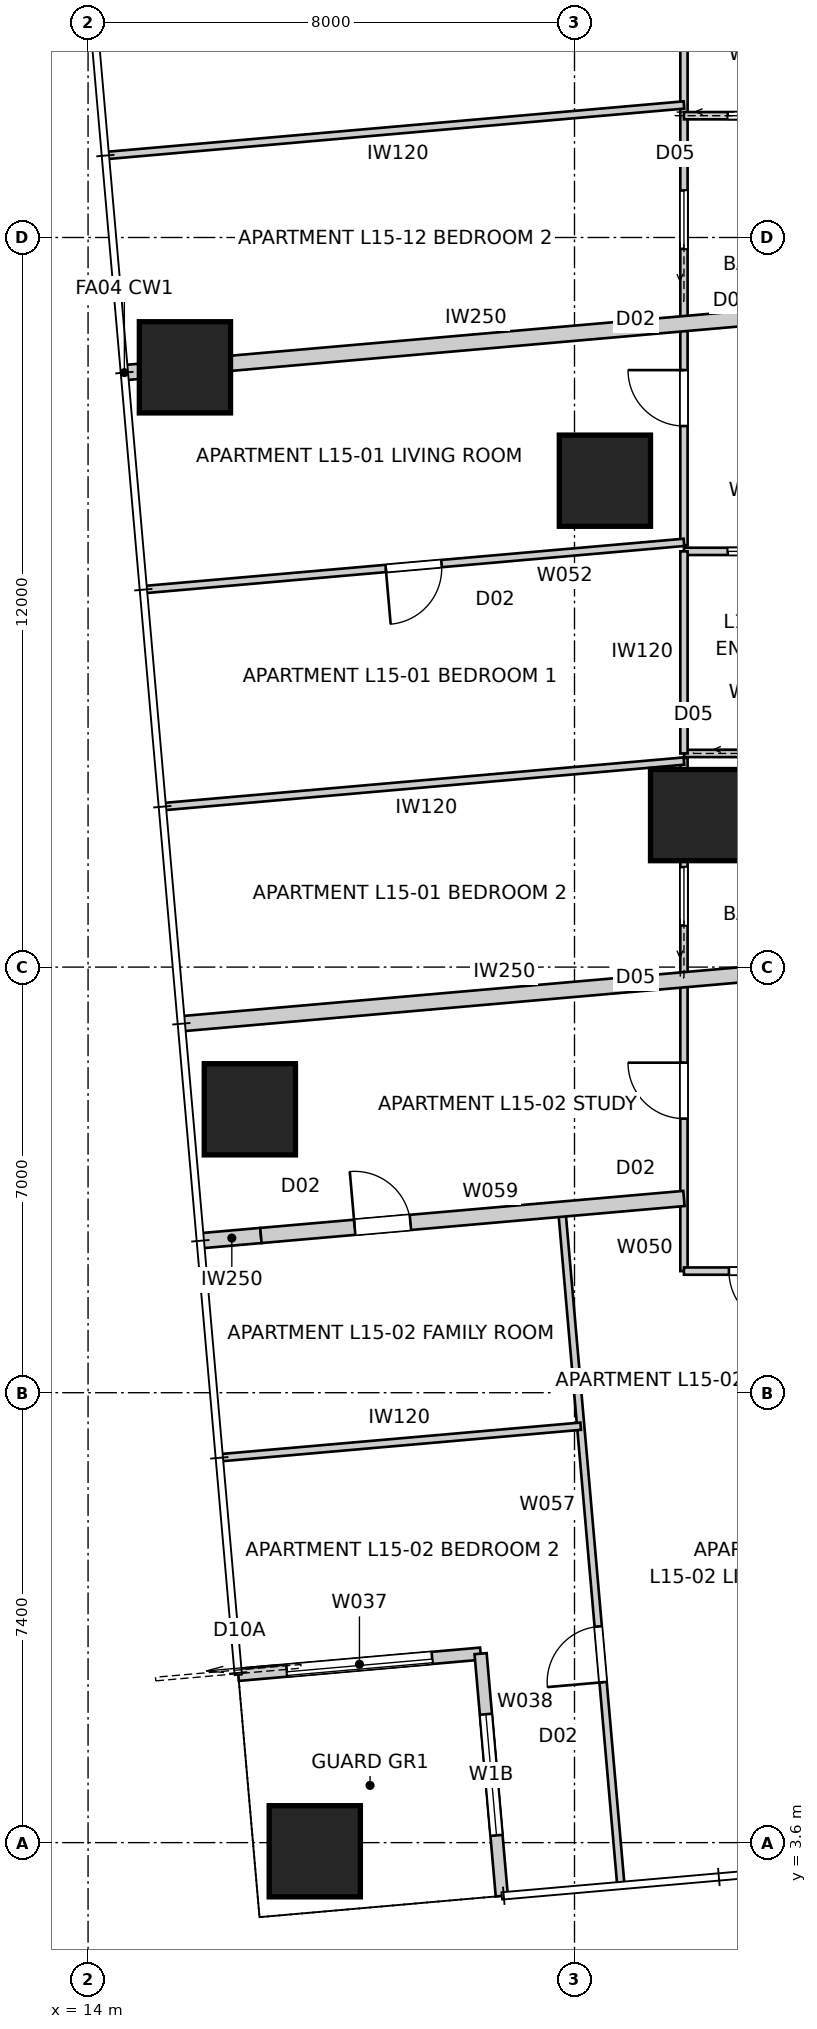
"""IFC4 building model, lengths in metres.
Left out: names, types, materials, properties, quantities, classifications, styles, units other than length and angle.
Written with IfcOpenShell. Run it as: python <this file> out.ifc"""

import sys

from ifc_helpers import new_model, si_unit, direction, frame, frame_2d, origin, origin_2d, place, context, subcontext, project, spatial, rectangle, extrude, element, fill, save


model = new_model("IFC4")
c1 = context("Model", 3, precision=1e-05, world=origin(), true_north=direction((0.0, 1.0)))
c2 = subcontext(c1, "Body", "Model", "MODEL_VIEW")
j1 = project(units=[si_unit("LENGTHUNIT", "METRE"), si_unit("PLANEANGLEUNIT", "RADIAN")], contexts=[c1])
p1 = place(None, origin())
s1 = spatial("IfcSite", under=j1, at=p1, CompositionType="ELEMENT")
p2 = place(p1, origin())
s2 = spatial("IfcBuilding", under=s1, at=p2, CompositionType="ELEMENT")
p3 = place(p2, frame((0.0, 0.0, 57.4)))
s3 = spatial("IfcBuildingStorey", under=s2, at=p3, CompositionType="ELEMENT", Elevation=57.4)
for number, where, z_axis, x_axis in (
    (1, (17.729, 3.458, 0.0), (0.0, 0.0, 1.0), (1.0, 0.0, 0.0)),
    (2, (15.593, 27.865, 0.0), (0.0, 0.0, 1.0), (1.0, 0.0, 0.0)),
    (3, (16.661, 15.661, 0.0), (0.0, 0.0, 1.0), (1.0, 0.0, 0.0)),
    (4, (22.5, 26.0, 0.0), (0.0, 0.0, 1.0), (1.0, 0.0, 0.0)),
    (5, (24.0, 20.5, 0.0), (0.0, 0.0, 1.0), (1.0, 0.0, 0.0)),
):
    element("IfcColumn", number, at=place(p3, frame(where, z_axis=z_axis, x_axis=x_axis)), inside=s3, PredefinedType="COLUMN", context=c2, shape_type="SweptSolid", body=[
        extrude(rectangle(XDim=1.5, YDim=1.5, at=origin_2d()), origin(), (0.0, 0.0, 1.0), 3.4),
    ])
p4 = place(p3, frame((16.471, 6.359, 0.0), z_axis=(0.0, 0.0, 1.0), x_axis=(0.99619418125, 0.087161650072, 0.0)))
e6 = element("IfcWall", 6, at=p4, inside=s3, PredefinedType="SOLIDWALL", context=c2, shape_type="SweptSolid", body=[
    extrude(rectangle(XDim=4.0, YDim=0.2, at=frame_2d((2.0, 0.0))), origin(), (0.0, 0.0, 1.0), 3.25),
])
p5 = place(p4, frame((0.8, 0.0, 0.0)))
e7 = element("IfcOpeningElement", 7, at=p5, cuts=e6, PredefinedType="OPENING", context=c2, shape_type="SweptSolid", body=[
    extrude(rectangle(XDim=2.4, YDim=2.1, at=frame_2d((1.2, 1.05))), frame((0.0, 0.11, 0.0), z_axis=(0.0, -1.0, 0.0), x_axis=(1.0, 0.0, 0.0)), (0.0, 0.0, 1.0), 0.22),
])
p6 = place(p3, frame((20.456, 6.708, 0.0), z_axis=(0.0, 0.0, 1.0), x_axis=(0.087156350505, -0.99619464492, 0.0)))
e8 = element("IfcWall", 8, at=p6, inside=s3, PredefinedType="SOLIDWALL", context=c2, shape_type="SweptSolid", body=[
    extrude(rectangle(XDim=4.0, YDim=0.2, at=frame_2d((2.0, 0.0))), origin(), (0.0, 0.0, 1.0), 3.25),
])
p7 = place(p6, frame((1.0, 0.0, 0.45)))
e9 = element("IfcOpeningElement", 9, at=p7, cuts=e8, PredefinedType="OPENING", context=c2, shape_type="SweptSolid", body=[
    extrude(rectangle(XDim=2.0, YDim=1.8, at=frame_2d((1.0, 0.9))), frame((0.0, 0.11, 0.0), z_axis=(0.0, -1.0, 0.0), x_axis=(1.0, 0.0, 0.0)), (0.0, 0.0, 1.0), 0.22),
])
p8 = place(p3, frame((15.534, 17.068, 0.0), z_axis=(0.0, 0.0, 1.0), x_axis=(0.996193939644, 0.08716441141, 0.0)))
e10 = element("IfcWall", 10, at=p8, inside=s3, PredefinedType="PARTITIONING", context=c2, shape_type="SweptSolid", body=[
    extrude(rectangle(XDim=10.736, YDim=0.25, at=frame_2d((5.368, 0.0))), origin(), (0.0, 0.0, 1.0), 3.25),
])
p9 = place(p3, frame((14.597, 27.778, 0.0), z_axis=(0.0, 0.0, 1.0), x_axis=(0.996195419442, 0.087147497287, 0.0)))
e11 = element("IfcWall", 11, at=p9, inside=s3, PredefinedType="PARTITIONING", context=c2, shape_type="SweptSolid", body=[
    extrude(rectangle(XDim=11.677, YDim=0.25, at=frame_2d((5.838, 0.0))), origin(), (0.0, 0.0, 1.0), 3.25),
])
p10 = place(p3, frame((26.2, 24.838, 0.0), z_axis=(0.0, 0.0, 1.0), x_axis=(-1.0, 0.0, 0.0)))
e12 = element("IfcWall", 12, at=p10, inside=s3, PredefinedType="PARTITIONING", context=c2, shape_type="SweptSolid", body=[
    extrude(rectangle(XDim=2.4, YDim=0.12, at=frame_2d((1.2, 0.0))), origin(), (0.0, 0.0, 1.0), 3.25),
])
p11 = place(p10, frame((0.72, 0.0, 0.0)))
e13 = element("IfcOpeningElement", 13, at=p11, cuts=e12, PredefinedType="OPENING", context=c2, shape_type="SweptSolid", body=[
    extrude(rectangle(XDim=0.96, YDim=2.1, at=frame_2d((0.48, 1.05))), frame((0.0, 0.07, 0.0), z_axis=(0.0, -1.0, 0.0), x_axis=(1.0, 0.0, 0.0)), (0.0, 0.0, 1.0), 0.14),
])
p12 = place(p3, frame((23.8, 24.936, 0.0), z_axis=(0.0, 0.0, 1.0), x_axis=(0.0, 1.0, 0.0)))
e14 = element("IfcWall", 14, at=p12, inside=s3, PredefinedType="PARTITIONING", context=c2, shape_type="SweptSolid", body=[
    extrude(rectangle(XDim=22.064, YDim=0.12, at=frame_2d((11.032, 0.0))), origin(), (0.0, 0.0, 1.0), 2.549),
])
p13 = place(p12, frame((12.155, 0.0, 0.0)))
e15 = element("IfcOpeningElement", 15, at=p13, cuts=e14, PredefinedType="OPENING", context=c2, shape_type="SweptSolid", body=[
    extrude(rectangle(XDim=0.92, YDim=2.34, at=frame_2d((0.46, 1.17))), frame((0.0, 0.07, 0.0), z_axis=(0.0, -1.0, 0.0), x_axis=(1.0, 0.0, 0.0)), (0.0, 0.0, 1.0), 0.14),
])
p14 = place(p12, frame((16.136, 0.0, 0.0)))
e16 = element("IfcOpeningElement", 16, at=p14, cuts=e14, PredefinedType="OPENING", context=c2, shape_type="SweptSolid", body=[
    extrude(rectangle(XDim=0.92, YDim=2.34, at=frame_2d((0.46, 1.17))), frame((0.0, 0.07, 0.0), z_axis=(0.0, -1.0, 0.0), x_axis=(1.0, 0.0, 0.0)), (0.0, 0.0, 1.0), 0.14),
])
p15 = place(p12, frame((1.964, 0.0, 0.0)))
e17 = element("IfcOpeningElement", 17, at=p15, cuts=e14, PredefinedType="OPENING", context=c2, shape_type="SweptSolid", body=[
    extrude(rectangle(XDim=0.92, YDim=2.34, at=frame_2d((0.46, 1.17))), frame((0.0, 0.07, 0.0), z_axis=(0.0, -1.0, 0.0), x_axis=(1.0, 0.0, 0.0)), (0.0, 0.0, 1.0), 0.14),
])
p16 = place(p12, frame((4.877, 0.0, 0.0)))
e18 = element("IfcOpeningElement", 18, at=p16, cuts=e14, PredefinedType="OPENING", context=c2, shape_type="SweptSolid", body=[
    extrude(rectangle(XDim=0.96, YDim=2.1, at=frame_2d((0.48, 1.05))), frame((0.0, 0.07, 0.0), z_axis=(0.0, -1.0, 0.0), x_axis=(1.0, 0.0, 0.0)), (0.0, 0.0, 1.0), 0.14),
])
p17 = place(p3, frame((23.8, 21.514, 0.0), z_axis=(0.0, 0.0, 1.0), x_axis=(1.0, 0.0, 0.0)))
e19 = element("IfcWall", 19, at=p17, inside=s3, PredefinedType="PARTITIONING", context=c2, shape_type="SweptSolid", body=[
    extrude(rectangle(XDim=2.4, YDim=0.12, at=frame_2d((1.2, 0.0))), origin(), (0.0, 0.0, 1.0), 3.25),
])
p18 = place(p17, frame((1.02, 0.0, 0.0)))
e20 = element("IfcOpeningElement", 20, at=p18, cuts=e19, PredefinedType="OPENING", context=c2, shape_type="SweptSolid", body=[
    extrude(rectangle(XDim=0.96, YDim=2.1, at=frame_2d((0.48, 1.05))), frame((0.0, 0.07, 0.0), z_axis=(0.0, -1.0, 0.0), x_axis=(1.0, 0.0, 0.0)), (0.0, 0.0, 1.0), 0.14),
])
p19 = place(p3, frame((23.8, 13.0, 0.0), z_axis=(0.0, 0.0, 1.0), x_axis=(0.0, 1.0, 0.0)))
e21 = element("IfcWall", 21, at=p19, inside=s3, PredefinedType="PARTITIONING", context=c2, shape_type="SweptSolid", body=[
    extrude(rectangle(XDim=8.439, YDim=0.12, at=frame_2d((4.219, 0.0))), origin(), (0.0, 0.0, 1.0), 2.549),
])
p20 = place(p19, frame((2.508, 0.0, 0.0)))
e22 = element("IfcOpeningElement", 22, at=p20, cuts=e21, PredefinedType="OPENING", context=c2, shape_type="SweptSolid", body=[
    extrude(rectangle(XDim=0.92, YDim=2.34, at=frame_2d((0.46, 1.17))), frame((0.0, 0.07, 0.0), z_axis=(0.0, -1.0, 0.0), x_axis=(1.0, 0.0, 0.0)), (0.0, 0.0, 1.0), 0.14),
])
p21 = place(p19, frame((5.685, 0.0, 0.0)))
e23 = element("IfcOpeningElement", 23, at=p21, cuts=e21, PredefinedType="OPENING", context=c2, shape_type="SweptSolid", body=[
    extrude(rectangle(XDim=0.96, YDim=2.1, at=frame_2d((0.48, 1.05))), frame((0.0, 0.07, 0.0), z_axis=(0.0, -1.0, 0.0), x_axis=(1.0, 0.0, 0.0)), (0.0, 0.0, 1.0), 0.14),
])
p22 = place(p3, frame((23.8, 21.514, 0.0), z_axis=(0.0, 0.0, 1.0), x_axis=(0.0, 1.0, 0.0)))
e24 = element("IfcWall", 24, at=p22, inside=s3, PredefinedType="PARTITIONING", context=c2, shape_type="SweptSolid", body=[
    extrude(rectangle(XDim=3.324, YDim=0.12, at=frame_2d((1.662, 0.0))), origin(), (0.0, 0.0, 1.0), 3.25),
])
p23 = place(p3, frame((23.8, 24.986, 0.0), z_axis=(0.0, 0.0, 1.0), x_axis=(-0.996194045583, -0.087163200634, 0.0)))
e25 = element("IfcWall", 25, at=p23, inside=s3, PredefinedType="PARTITIONING", context=c2, shape_type="SweptSolid", body=[
    extrude(rectangle(XDim=8.885, YDim=0.12, at=frame_2d((4.442, 0.0))), origin(), (0.0, 0.0, 1.0), 3.25),
])
p24 = place(p23, frame((4.002, 0.0, 0.0)))
e26 = element("IfcOpeningElement", 26, at=p24, cuts=e25, PredefinedType="OPENING", context=c2, shape_type="SweptSolid", body=[
    extrude(rectangle(XDim=0.92, YDim=2.34, at=frame_2d((0.46, 1.17))), frame((0.0, 0.07, 0.0), z_axis=(0.0, -1.0, 0.0), x_axis=(1.0, 0.0, 0.0)), (0.0, 0.0, 1.0), 0.14),
])
p25 = place(p3, frame((23.8, 21.389, 0.0), z_axis=(0.0, 0.0, 1.0), x_axis=(-0.996194273991, -0.087160590107, 0.0)))
e27 = element("IfcWall", 27, at=p25, inside=s3, PredefinedType="PARTITIONING", context=c2, shape_type="SweptSolid", body=[
    extrude(rectangle(XDim=8.571, YDim=0.12, at=frame_2d((4.286, 0.0))), origin(), (0.0, 0.0, 1.0), 3.25),
])
p26 = place(p3, frame((30.333, 13.0, 0.0), z_axis=(0.0, 0.0, 1.0), x_axis=(-1.0, 0.0, 0.0)))
e28 = element("IfcWall", 28, at=p26, inside=s3, PredefinedType="PARTITIONING", context=c2, shape_type="SweptSolid", body=[
    extrude(rectangle(XDim=6.533, YDim=0.12, at=frame_2d((3.267, 0.0))), origin(), (0.0, 0.0, 1.0), 3.25),
])
p27 = place(p26, frame((4.873, 0.0, 0.0)))
e29 = element("IfcOpeningElement", 29, at=p27, cuts=e28, PredefinedType="OPENING", context=c2, shape_type="SweptSolid", body=[
    extrude(rectangle(XDim=0.92, YDim=2.34, at=frame_2d((0.46, 1.17))), frame((0.0, 0.07, 0.0), z_axis=(0.0, -1.0, 0.0), x_axis=(1.0, 0.0, 0.0)), (0.0, 0.0, 1.0), 0.14),
])
p28 = place(p26, frame((1.162, 0.0, 0.0)))
e30 = element("IfcOpeningElement", 30, at=p28, cuts=e28, PredefinedType="OPENING", context=c2, shape_type="SweptSolid", body=[
    extrude(rectangle(XDim=0.96, YDim=2.1, at=frame_2d((0.48, 1.05))), frame((0.0, 0.07, 0.0), z_axis=(0.0, -1.0, 0.0), x_axis=(1.0, 0.0, 0.0)), (0.0, 0.0, 1.0), 0.14),
])
p29 = place(p3, frame((22.759, 2.934, 0.0), z_axis=(0.0, 0.0, 1.0), x_axis=(-0.087130477128, 0.996196908224, 0.0)))
e31 = element("IfcWall", 31, at=p29, inside=s3, PredefinedType="PARTITIONING", context=c2, shape_type="SweptSolid", body=[
    extrude(rectangle(XDim=11.127, YDim=0.12, at=frame_2d((5.563, 0.0))), origin(), (0.0, 0.0, 1.0), 3.25),
])
p30 = place(p29, frame((3.317, 0.0, 0.0)))
e32 = element("IfcOpeningElement", 32, at=p30, cuts=e31, PredefinedType="OPENING", context=c2, shape_type="SweptSolid", body=[
    extrude(rectangle(XDim=0.92, YDim=2.34, at=frame_2d((0.46, 1.17))), frame((0.0, 0.07, 0.0), z_axis=(0.0, -1.0, 0.0), x_axis=(1.0, 0.0, 0.0)), (0.0, 0.0, 1.0), 0.14),
])
p31 = place(p3, frame((15.886, 13.502, 0.0), z_axis=(0.0, 0.0, 1.0), x_axis=(0.996187918168, 0.087233202944, 0.0)))
e33 = element("IfcWall", 33, at=p31, inside=s3, PredefinedType="PARTITIONING", context=c2, shape_type="SweptSolid", body=[
    extrude(rectangle(XDim=0.96, YDim=0.25, at=frame_2d((0.48, 0.0))), origin(), (0.0, 0.0, 1.0), 3.25),
])
p32 = place(p3, frame((16.843, 13.586, 0.0), z_axis=(0.0, 0.0, 1.0), x_axis=(0.996195462691, 0.087147002895, 0.0)))
e34 = element("IfcWall", 34, at=p32, inside=s3, PredefinedType="PARTITIONING", context=c2, shape_type="SweptSolid", body=[
    extrude(rectangle(XDim=6.984, YDim=0.25, at=frame_2d((3.492, 0.0))), origin(), (0.0, 0.0, 1.0), 2.638),
])
p33 = place(p32, frame((1.548, 0.0, 0.0)))
e35 = element("IfcOpeningElement", 35, at=p33, cuts=e34, PredefinedType="OPENING", context=c2, shape_type="SweptSolid", body=[
    extrude(rectangle(XDim=0.92, YDim=2.34, at=frame_2d((0.46, 1.17))), frame((0.0, 0.135, 0.0), z_axis=(0.0, -1.0, 0.0), x_axis=(1.0, 0.0, 0.0)), (0.0, 0.0, 1.0), 0.27),
])
p34 = place(p3, frame((16.198, 9.933, 0.0), z_axis=(0.0, 0.0, 1.0), x_axis=(0.996196712973, 0.08713270948, 0.0)))
e36 = element("IfcWall", 36, at=p34, inside=s3, PredefinedType="PARTITIONING", context=c2, shape_type="SweptSolid", body=[
    extrude(rectangle(XDim=5.926, YDim=0.12, at=frame_2d((2.963, 0.0))), origin(), (0.0, 0.0, 1.0), 3.25),
])
p35 = place(p3, frame((23.8, 32.003, 0.0), z_axis=(0.0, 0.0, 1.0), x_axis=(1.0, 0.0, 0.0)))
e37 = element("IfcWall", 37, at=p35, inside=s3, PredefinedType="PARTITIONING", context=c2, shape_type="SweptSolid", body=[
    extrude(rectangle(XDim=2.4, YDim=0.12, at=frame_2d((1.2, 0.0))), origin(), (0.0, 0.0, 1.0), 3.25),
])
p36 = place(p35, frame((0.72, 0.0, 0.0)))
e38 = element("IfcOpeningElement", 38, at=p36, cuts=e37, PredefinedType="OPENING", context=c2, shape_type="SweptSolid", body=[
    extrude(rectangle(XDim=0.96, YDim=2.1, at=frame_2d((0.48, 1.05))), frame((0.0, 0.07, 0.0), z_axis=(0.0, -1.0, 0.0), x_axis=(1.0, 0.0, 0.0)), (0.0, 0.0, 1.0), 0.14),
])
p37 = place(p3, frame((23.8, 32.18, 0.0), z_axis=(0.0, 0.0, 1.0), x_axis=(-0.996193828936, -0.087165676674, 0.0)))
e39 = element("IfcWall", 39, at=p37, inside=s3, PredefinedType="PARTITIONING", context=c2, shape_type="SweptSolid", body=[
    extrude(rectangle(XDim=9.512, YDim=0.12, at=frame_2d((4.756, 0.0))), origin(), (0.0, 0.0, 1.0), 3.25),
])
p38 = place(p5, origin())
e40 = element("IfcDoor", 40, at=p38, inside=s3, OperationType="SLIDING_TO_LEFT", PredefinedType="DOOR", context=c2, shape_type="SweptSolid", body=[
    extrude(rectangle(XDim=2.4, YDim=2.1, at=frame_2d((1.2, 1.05))), frame((0.0, 0.025, 0.0), z_axis=(0.0, -1.0, 0.0), x_axis=(1.0, 0.0, 0.0)), (0.0, 0.0, 1.0), 0.05),
])
fill(e7, e40)
p39 = place(p7, origin())
e41 = element("IfcWindow", 41, at=p39, inside=s3, PartitioningType="SINGLE_PANEL", PredefinedType="WINDOW", context=c2, shape_type="SweptSolid", body=[
    extrude(rectangle(XDim=2.0, YDim=1.8, at=frame_2d((1.0, 0.9))), frame((0.0, 0.03, 0.0), z_axis=(0.0, -1.0, 0.0), x_axis=(1.0, 0.0, 0.0)), (0.0, 0.0, 1.0), 0.06),
])
fill(e9, e41)
p40 = place(p15, origin())
e42 = element("IfcDoor", 42, at=p40, inside=s3, OperationType="SINGLE_SWING_RIGHT", PredefinedType="DOOR", context=c2, shape_type="SweptSolid", body=[
    extrude(rectangle(XDim=0.92, YDim=2.34, at=frame_2d((0.46, 1.17))), frame((0.0, 0.025, 0.0), z_axis=(0.0, -1.0, 0.0), x_axis=(1.0, 0.0, 0.0)), (0.0, 0.0, 1.0), 0.05),
])
fill(e17, e42)
p41 = place(p11, origin())
e43 = element("IfcDoor", 43, at=p41, inside=s3, OperationType="SLIDING_TO_LEFT", PredefinedType="DOOR", context=c2, shape_type="SweptSolid", body=[
    extrude(rectangle(XDim=0.96, YDim=2.1, at=frame_2d((0.48, 1.05))), frame((0.0, 0.025, 0.0), z_axis=(0.0, -1.0, 0.0), x_axis=(1.0, 0.0, 0.0)), (0.0, 0.0, 1.0), 0.05),
])
fill(e13, e43)
p42 = place(p20, origin())
e44 = element("IfcDoor", 44, at=p42, inside=s3, OperationType="SINGLE_SWING_RIGHT", PredefinedType="DOOR", context=c2, shape_type="SweptSolid", body=[
    extrude(rectangle(XDim=0.92, YDim=2.34, at=frame_2d((0.46, 1.17))), frame((0.0, 0.025, 0.0), z_axis=(0.0, -1.0, 0.0), x_axis=(1.0, 0.0, 0.0)), (0.0, 0.0, 1.0), 0.05),
])
fill(e22, e44)
p43 = place(p27, origin())
e45 = element("IfcDoor", 45, at=p43, inside=s3, OperationType="SINGLE_SWING_LEFT", PredefinedType="DOOR", context=c2, shape_type="SweptSolid", body=[
    extrude(rectangle(XDim=0.92, YDim=2.34, at=frame_2d((0.46, 1.17))), frame((0.0, 0.025, 0.0), z_axis=(0.0, -1.0, 0.0), x_axis=(1.0, 0.0, 0.0)), (0.0, 0.0, 1.0), 0.05),
])
fill(e29, e45)
p44 = place(p36, origin())
e46 = element("IfcDoor", 46, at=p44, inside=s3, OperationType="SLIDING_TO_LEFT", PredefinedType="DOOR", context=c2, shape_type="SweptSolid", body=[
    extrude(rectangle(XDim=0.96, YDim=2.1, at=frame_2d((0.48, 1.05))), frame((0.0, 0.025, 0.0), z_axis=(0.0, -1.0, 0.0), x_axis=(1.0, 0.0, 0.0)), (0.0, 0.0, 1.0), 0.05),
])
fill(e38, e46)
p45 = place(p24, origin())
e47 = element("IfcDoor", 47, at=p45, inside=s3, OperationType="SINGLE_SWING_RIGHT", PredefinedType="DOOR", context=c2, shape_type="SweptSolid", body=[
    extrude(rectangle(XDim=0.92, YDim=2.34, at=frame_2d((0.46, 1.17))), frame((0.0, 0.025, 0.0), z_axis=(0.0, -1.0, 0.0), x_axis=(1.0, 0.0, 0.0)), (0.0, 0.0, 1.0), 0.05),
])
fill(e26, e47)
p46 = place(p33, origin())
e48 = element("IfcDoor", 48, at=p46, inside=s3, OperationType="SINGLE_SWING_LEFT", PredefinedType="DOOR", context=c2, shape_type="SweptSolid", body=[
    extrude(rectangle(XDim=0.92, YDim=2.34, at=frame_2d((0.46, 1.17))), frame((0.0, 0.025, 0.0), z_axis=(0.0, -1.0, 0.0), x_axis=(1.0, 0.0, 0.0)), (0.0, 0.0, 1.0), 0.05),
])
fill(e35, e48)
p47 = place(p30, origin())
e49 = element("IfcDoor", 49, at=p47, inside=s3, OperationType="SINGLE_SWING_LEFT", PredefinedType="DOOR", context=c2, shape_type="SweptSolid", body=[
    extrude(rectangle(XDim=0.92, YDim=2.34, at=frame_2d((0.46, 1.17))), frame((0.0, 0.025, 0.0), z_axis=(0.0, -1.0, 0.0), x_axis=(1.0, 0.0, 0.0)), (0.0, 0.0, 1.0), 0.05),
])
fill(e32, e49)
p48 = place(p16, origin())
e50 = element("IfcDoor", 50, at=p48, inside=s3, OperationType="SLIDING_TO_LEFT", PredefinedType="DOOR", context=c2, shape_type="SweptSolid", body=[
    extrude(rectangle(XDim=0.96, YDim=2.1, at=frame_2d((0.48, 1.05))), frame((0.0, 0.025, 0.0), z_axis=(0.0, -1.0, 0.0), x_axis=(1.0, 0.0, 0.0)), (0.0, 0.0, 1.0), 0.05),
])
fill(e18, e50)
p49 = place(p21, origin())
e51 = element("IfcDoor", 51, at=p49, inside=s3, OperationType="SLIDING_TO_LEFT", PredefinedType="DOOR", context=c2, shape_type="SweptSolid", body=[
    extrude(rectangle(XDim=0.96, YDim=2.1, at=frame_2d((0.48, 1.05))), frame((0.0, 0.025, 0.0), z_axis=(0.0, -1.0, 0.0), x_axis=(1.0, 0.0, 0.0)), (0.0, 0.0, 1.0), 0.05),
])
fill(e23, e51)
save(model, sys.argv[1])
